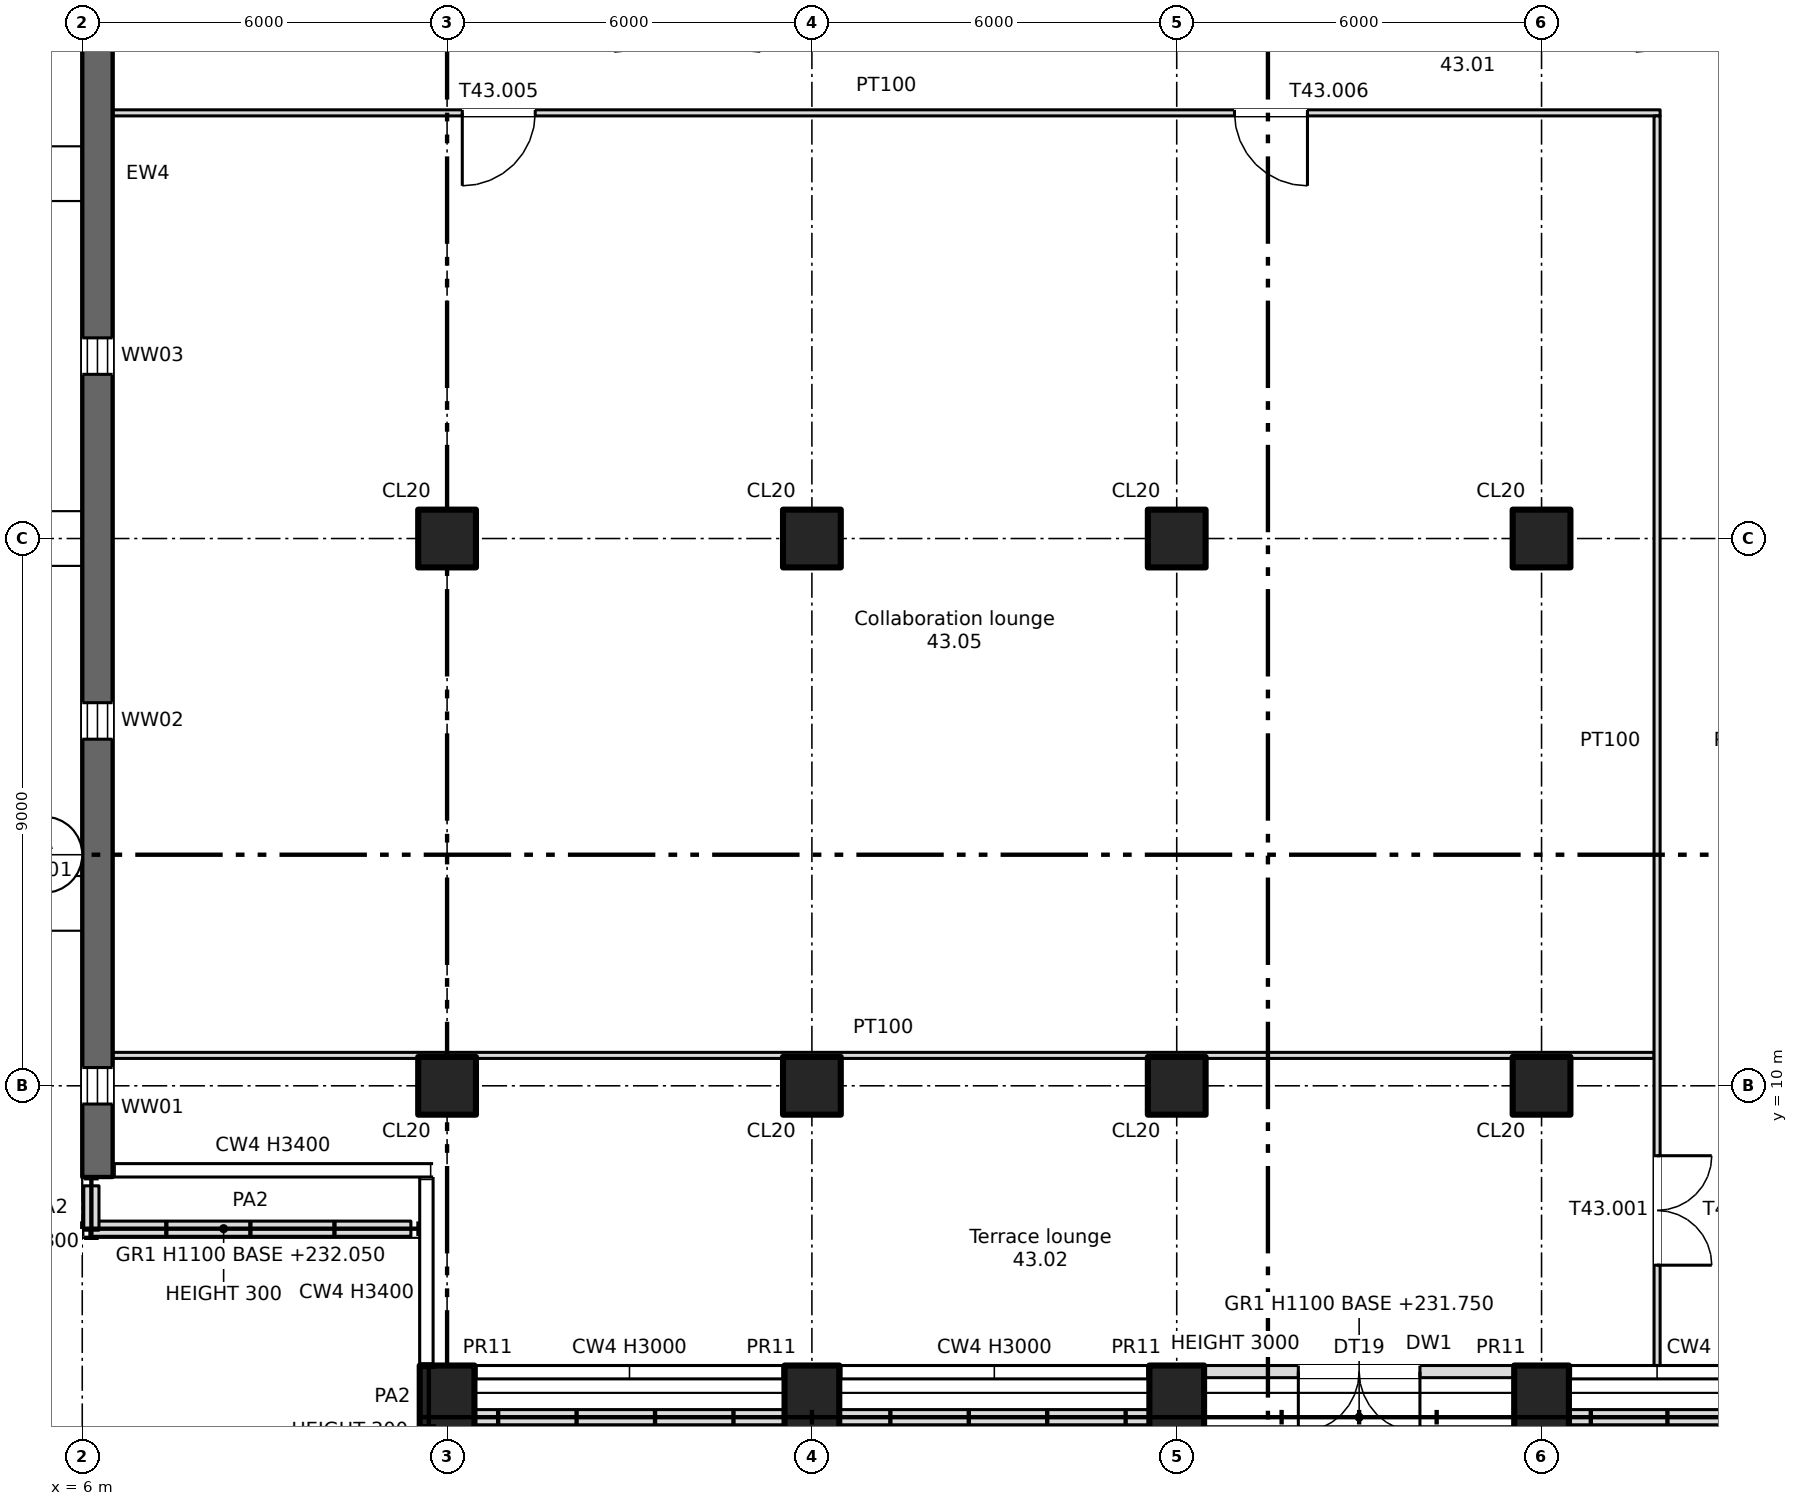
"""IFC4 building model, lengths in metres.
Left out: names, types, materials, properties, quantities, classifications, styles, units other than length and angle.
Written with IfcOpenShell. Run it as: python <this file> out.ifc"""

import sys

from ifc_helpers import new_model, si_unit, direction, frame, frame_2d, origin, origin_2d, place, context, subcontext, project, spatial, rectangle, extrude, element, fill, save


model = new_model("IFC4")
c1 = context("Model", 3, precision=1e-05, world=origin(), true_north=direction((0.0, 1.0)))
c2 = subcontext(c1, "Body", "Model", "MODEL_VIEW")
j1 = project(units=[si_unit("LENGTHUNIT", "METRE"), si_unit("PLANEANGLEUNIT", "RADIAN")], contexts=[c1])
p1 = place(None, origin())
s1 = spatial("IfcSite", under=j1, at=p1, CompositionType="ELEMENT")
p2 = place(p1, origin())
s2 = spatial("IfcBuilding", under=s1, at=p2, CompositionType="ELEMENT")
p3 = place(p2, frame((0.0, 0.0, 231.75)))
s3 = spatial("IfcBuildingStorey", under=s2, at=p3, CompositionType="ELEMENT", Elevation=231.75)
for number, where, z_axis, x_axis in (
    (1, (12.0, 4.7, 0.0), (0.0, 0.0, 1.0), (1.0, 0.0, 0.0)),
    (2, (18.0, 4.7, 0.0), (0.0, 0.0, 1.0), (1.0, 0.0, 0.0)),
    (3, (24.0, 4.7, 0.0), (0.0, 0.0, 1.0), (1.0, 0.0, 0.0)),
    (4, (30.0, 4.7, 0.0), (0.0, 0.0, 1.0), (1.0, 0.0, 0.0)),
):
    element("IfcColumn", number, at=place(p3, frame(where, z_axis=z_axis, x_axis=x_axis)), inside=s3, PredefinedType="COLUMN", context=c2, shape_type="SweptSolid", body=[
        extrude(rectangle(XDim=0.9, YDim=1.4, at=origin_2d()), origin(), (0.0, 0.0, 1.0), 3.4),
    ])
for number, where, z_axis, x_axis in (
    (5, (12.0, 10.0, 0.0), (0.0, 0.0, 1.0), (1.0, 0.0, 0.0)),
    (6, (12.0, 19.0, 0.0), (0.0, 0.0, 1.0), (1.0, 0.0, 0.0)),
    (7, (18.0, 10.0, 0.0), (0.0, 0.0, 1.0), (1.0, 0.0, 0.0)),
    (8, (18.0, 19.0, 0.0), (0.0, 0.0, 1.0), (1.0, 0.0, 0.0)),
    (9, (24.0, 10.0, 0.0), (0.0, 0.0, 1.0), (1.0, 0.0, 0.0)),
    (10, (24.0, 19.0, 0.0), (0.0, 0.0, 1.0), (1.0, 0.0, 0.0)),
    (11, (30.0, 10.0, 0.0), (0.0, 0.0, 1.0), (1.0, 0.0, 0.0)),
    (12, (30.0, 19.0, 0.0), (0.0, 0.0, 1.0), (1.0, 0.0, 0.0)),
):
    element("IfcColumn", number, at=place(p3, frame(where, z_axis=z_axis, x_axis=x_axis)), inside=s3, PredefinedType="COLUMN", context=c2, shape_type="SweptSolid", body=[
        extrude(rectangle(XDim=0.95, YDim=0.95, at=origin_2d()), origin(), (0.0, 0.0, 1.0), 3.4),
    ])
p4 = place(p3, frame((6.25, 8.5, 0.0), z_axis=(0.0, 0.0, 1.0), x_axis=(0.0, 1.0, 0.0)))
e13 = element("IfcWall", 13, at=p4, inside=s3, PredefinedType="SHEAR", context=c2, shape_type="SweptSolid", body=[
    extrude(rectangle(XDim=33.0, YDim=0.5, at=frame_2d((16.5, 0.0))), origin(), (0.0, 0.0, 1.0), 3.4),
])
p5 = place(p4, frame((1.2, 0.0, 0.6)))
e14 = element("IfcOpeningElement", 14, at=p5, cuts=e13, PredefinedType="OPENING", context=c2, shape_type="SweptSolid", body=[
    extrude(rectangle(XDim=0.6, YDim=2.4, at=frame_2d((0.3, 1.2))), frame((0.0, 0.26, 0.0), z_axis=(0.0, -1.0, 0.0), x_axis=(1.0, 0.0, 0.0)), (0.0, 0.0, 1.0), 0.52),
])
p6 = place(p4, frame((7.2, 0.0, 0.6)))
e15 = element("IfcOpeningElement", 15, at=p6, cuts=e13, PredefinedType="OPENING", context=c2, shape_type="SweptSolid", body=[
    extrude(rectangle(XDim=0.6, YDim=2.4, at=frame_2d((0.3, 1.2))), frame((0.0, 0.26, 0.0), z_axis=(0.0, -1.0, 0.0), x_axis=(1.0, 0.0, 0.0)), (0.0, 0.0, 1.0), 0.52),
])
p7 = place(p4, frame((13.2, 0.0, 0.6)))
e16 = element("IfcOpeningElement", 16, at=p7, cuts=e13, PredefinedType="OPENING", context=c2, shape_type="SweptSolid", body=[
    extrude(rectangle(XDim=0.6, YDim=2.4, at=frame_2d((0.3, 1.2))), frame((0.0, 0.26, 0.0), z_axis=(0.0, -1.0, 0.0), x_axis=(1.0, 0.0, 0.0)), (0.0, 0.0, 1.0), 0.52),
])
p8 = place(p3, frame((24.45, 5.3, 0.0), z_axis=(0.0, 0.0, 1.0), x_axis=(1.0, 0.0, 0.0)))
e17 = element("IfcWall", 17, at=p8, inside=s3, PredefinedType="SOLIDWALL", context=c2, shape_type="SweptSolid", body=[
    extrude(rectangle(XDim=5.1, YDim=0.2, at=frame_2d((2.55, 0.0))), origin(), (0.0, 0.0, 1.0), 3.0),
])
p9 = place(p8, frame((1.55, 0.0, 0.0)))
e18 = element("IfcOpeningElement", 18, at=p9, cuts=e17, PredefinedType="OPENING", context=c2, shape_type="SweptSolid", body=[
    extrude(rectangle(XDim=2.0, YDim=2.4, at=frame_2d((1.0, 1.2))), frame((0.0, 0.11, 0.0), z_axis=(0.0, -1.0, 0.0), x_axis=(1.0, 0.0, 0.0)), (0.0, 0.0, 1.0), 0.22),
])
p10 = place(p3, frame((11.405, 7.65, 0.0), z_axis=(0.0, 0.0, 1.0), x_axis=(-1.0, 0.0, 0.0)))
e19 = element("IfcWall", 19, at=p10, inside=s3, PredefinedType="PARAPET", context=c2, shape_type="SweptSolid", body=[
    extrude(rectangle(XDim=5.28, YDim=0.25, at=frame_2d((2.64, 0.0))), origin(), (0.0, 0.0, 1.0), 0.3),
])
for number, where, z_axis, x_axis in (
    (20, (6.15, 7.625, 0.0), (0.0, 0.0, 1.0), (0.0, 1.0, 0.0)),
    (21, (11.7, 4.525, 0.0), (0.0, 0.0, 1.0), (0.0, 1.0, 0.0)),
):
    element("IfcWall", number, at=place(p3, frame(where, z_axis=z_axis, x_axis=x_axis)), inside=s3, PredefinedType="PARAPET", context=c2, shape_type="SweptSolid", body=[
        extrude(rectangle(XDim=0.73, YDim=0.25, at=frame_2d((0.365, 0.0))), origin(), (0.0, 0.0, 1.0), 0.3),
    ])
p11 = place(p3, frame((11.675, 4.55, 0.0), z_axis=(0.0, 0.0, 1.0), x_axis=(1.0, 0.0, 0.0)))
e22 = element("IfcWall", 22, at=p11, inside=s3, PredefinedType="PARAPET", context=c2, shape_type="SweptSolid", body=[
    extrude(rectangle(XDim=12.65, YDim=0.25, at=frame_2d((6.325, 0.0))), origin(), (0.0, 0.0, 1.0), 0.3),
])
p12 = place(p3, frame((29.675, 4.55, 0.0), z_axis=(0.0, 0.0, 1.0), x_axis=(1.0, 0.0, 0.0)))
e23 = element("IfcWall", 23, at=p12, inside=s3, PredefinedType="PARAPET", context=c2, shape_type="SweptSolid", body=[
    extrude(rectangle(XDim=18.65, YDim=0.25, at=frame_2d((9.325, 0.0))), origin(), (0.0, 0.0, 1.0), 0.3),
])
p13 = place(p3, frame((6.5, 10.5, 0.0), z_axis=(0.0, 0.0, 1.0), x_axis=(1.0, 0.0, 0.0)))
e24 = element("IfcWall", 24, at=p13, inside=s3, PredefinedType="PARTITIONING", context=c2, shape_type="SweptSolid", body=[
    extrude(rectangle(XDim=25.35, YDim=0.1, at=frame_2d((12.675, 0.0))), origin(), (0.0, 0.0, 1.0), 3.4),
])
p14 = place(p3, frame((6.5, 26.0, 0.0), z_axis=(0.0, 0.0, 1.0), x_axis=(1.0, 0.0, 0.0)))
e25 = element("IfcWall", 25, at=p14, inside=s3, PredefinedType="PARTITIONING", context=c2, shape_type="SweptSolid", body=[
    extrude(rectangle(XDim=25.45, YDim=0.1, at=frame_2d((12.725, 0.0))), origin(), (0.0, 0.0, 1.0), 3.4),
])
p15 = place(p14, frame((5.75, 0.0, 0.0)))
e26 = element("IfcOpeningElement", 26, at=p15, cuts=e25, PredefinedType="OPENING", context=c2, shape_type="SweptSolid", body=[
    extrude(rectangle(XDim=1.2, YDim=2.1, at=frame_2d((0.6, 1.05))), frame((0.0, 0.06, 0.0), z_axis=(0.0, -1.0, 0.0), x_axis=(1.0, 0.0, 0.0)), (0.0, 0.0, 1.0), 0.12),
])
p16 = place(p14, frame((18.45, 0.0, 0.0)))
e27 = element("IfcOpeningElement", 27, at=p16, cuts=e25, PredefinedType="OPENING", context=c2, shape_type="SweptSolid", body=[
    extrude(rectangle(XDim=1.2, YDim=2.1, at=frame_2d((0.6, 1.05))), frame((0.0, 0.06, 0.0), z_axis=(0.0, -1.0, 0.0), x_axis=(1.0, 0.0, 0.0)), (0.0, 0.0, 1.0), 0.12),
])
p17 = place(p3, frame((31.9, 5.4, 0.0), z_axis=(0.0, 0.0, 1.0), x_axis=(0.0, 1.0, 0.0)))
e28 = element("IfcWall", 28, at=p17, inside=s3, PredefinedType="PARTITIONING", context=c2, shape_type="SweptSolid", body=[
    extrude(rectangle(XDim=20.55, YDim=0.1, at=frame_2d((10.275, 0.0))), origin(), (0.0, 0.0, 1.0), 3.4),
])
p18 = place(p17, frame((1.65, 0.0, 0.0)))
e29 = element("IfcOpeningElement", 29, at=p18, cuts=e28, PredefinedType="OPENING", context=c2, shape_type="SweptSolid", body=[
    extrude(rectangle(XDim=1.8, YDim=2.1, at=frame_2d((0.9, 1.05))), frame((0.0, 0.06, 0.0), z_axis=(0.0, -1.0, 0.0), x_axis=(1.0, 0.0, 0.0)), (0.0, 0.0, 1.0), 0.12),
])
p19 = place(p5, origin())
e30 = element("IfcWindow", 30, at=p19, inside=s3, PartitioningType="SINGLE_PANEL", PredefinedType="WINDOW", context=c2, shape_type="SweptSolid", body=[
    extrude(rectangle(XDim=0.6, YDim=2.4, at=frame_2d((0.3, 1.2))), frame((0.0, 0.03, 0.0), z_axis=(0.0, -1.0, 0.0), x_axis=(1.0, 0.0, 0.0)), (0.0, 0.0, 1.0), 0.06),
])
fill(e14, e30)
p20 = place(p6, origin())
e31 = element("IfcWindow", 31, at=p20, inside=s3, PartitioningType="SINGLE_PANEL", PredefinedType="WINDOW", context=c2, shape_type="SweptSolid", body=[
    extrude(rectangle(XDim=0.6, YDim=2.4, at=frame_2d((0.3, 1.2))), frame((0.0, 0.03, 0.0), z_axis=(0.0, -1.0, 0.0), x_axis=(1.0, 0.0, 0.0)), (0.0, 0.0, 1.0), 0.06),
])
fill(e15, e31)
p21 = place(p7, origin())
e32 = element("IfcWindow", 32, at=p21, inside=s3, PartitioningType="SINGLE_PANEL", PredefinedType="WINDOW", context=c2, shape_type="SweptSolid", body=[
    extrude(rectangle(XDim=0.6, YDim=2.4, at=frame_2d((0.3, 1.2))), frame((0.0, 0.03, 0.0), z_axis=(0.0, -1.0, 0.0), x_axis=(1.0, 0.0, 0.0)), (0.0, 0.0, 1.0), 0.06),
])
fill(e16, e32)
p22 = place(p9, frame((2.0, 0.0, 0.0), z_axis=(0.0, 0.0, 1.0), x_axis=(-1.0, 0.0, 0.0)))
e33 = element("IfcDoor", 33, at=p22, inside=s3, OperationType="DOUBLE_DOOR_SINGLE_SWING", PredefinedType="DOOR", context=c2, shape_type="SweptSolid", body=[
    extrude(rectangle(XDim=2.0, YDim=2.4, at=frame_2d((1.0, 1.2))), frame((0.0, 0.025, 0.0), z_axis=(0.0, -1.0, 0.0), x_axis=(1.0, 0.0, 0.0)), (0.0, 0.0, 1.0), 0.05),
])
fill(e18, e33)
p23 = place(p18, origin())
e34 = element("IfcDoor", 34, at=p23, inside=s3, OperationType="DOUBLE_DOOR_SINGLE_SWING", PredefinedType="DOOR", context=c2, shape_type="SweptSolid", body=[
    extrude(rectangle(XDim=1.8, YDim=2.1, at=frame_2d((0.9, 1.05))), frame((0.0, 0.025, 0.0), z_axis=(0.0, -1.0, 0.0), x_axis=(1.0, 0.0, 0.0)), (0.0, 0.0, 1.0), 0.05),
])
fill(e29, e34)
p24 = place(p15, origin())
e35 = element("IfcDoor", 35, at=p24, inside=s3, OperationType="SINGLE_SWING_LEFT", PredefinedType="DOOR", context=c2, shape_type="SweptSolid", body=[
    extrude(rectangle(XDim=1.2, YDim=2.1, at=frame_2d((0.6, 1.05))), frame((0.0, 0.025, 0.0), z_axis=(0.0, -1.0, 0.0), x_axis=(1.0, 0.0, 0.0)), (0.0, 0.0, 1.0), 0.05),
])
fill(e26, e35)
p25 = place(p16, origin())
e36 = element("IfcDoor", 36, at=p25, inside=s3, OperationType="SINGLE_SWING_RIGHT", PredefinedType="DOOR", context=c2, shape_type="SweptSolid", body=[
    extrude(rectangle(XDim=1.2, YDim=2.1, at=frame_2d((0.6, 1.05))), frame((0.0, 0.025, 0.0), z_axis=(0.0, -1.0, 0.0), x_axis=(1.0, 0.0, 0.0)), (0.0, 0.0, 1.0), 0.05),
])
fill(e27, e36)
save(model, sys.argv[1])
